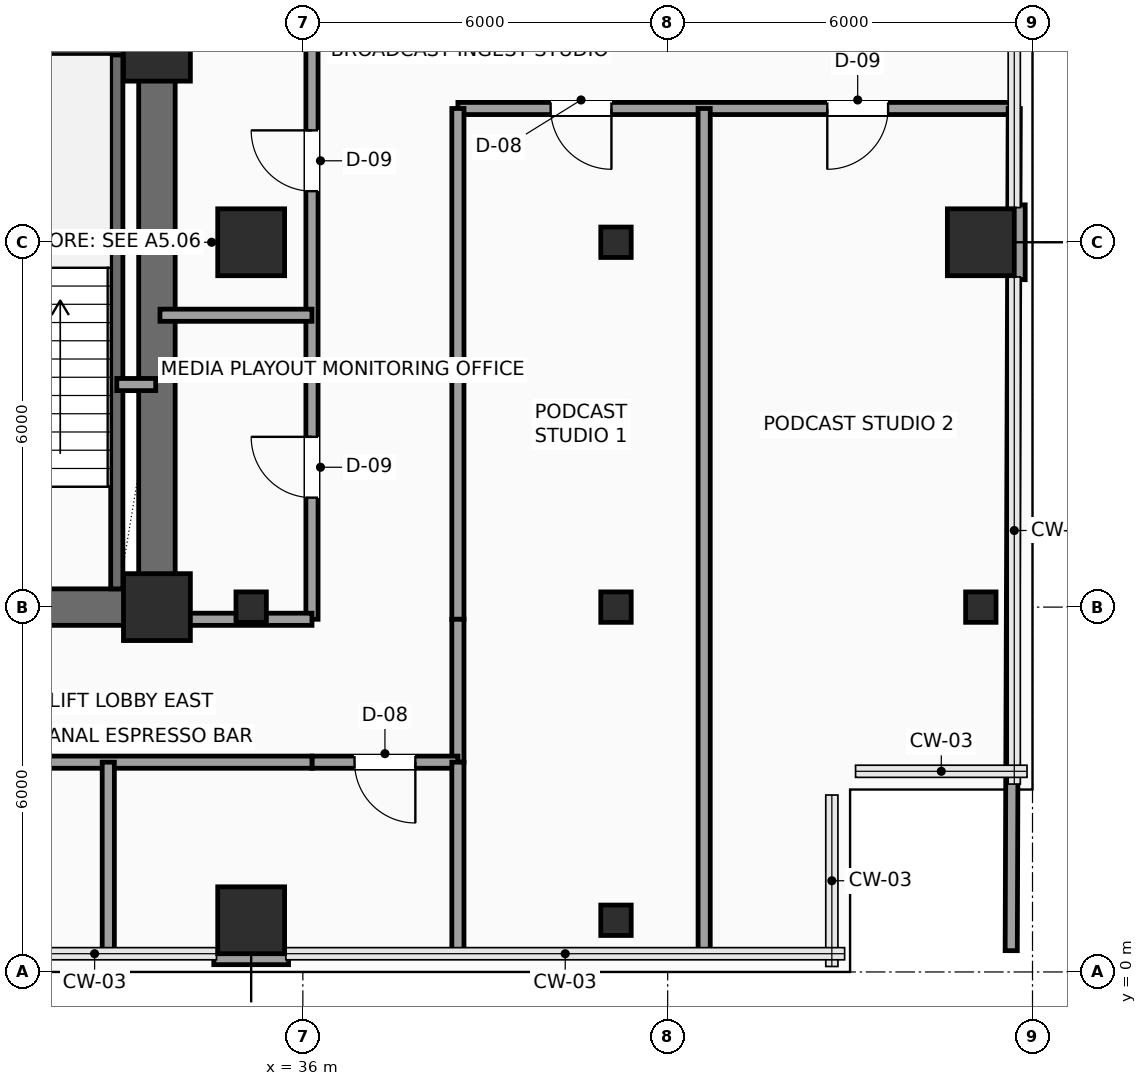
"""IFC4 building model, lengths in metres.
Left out: names, types, materials, properties, quantities, classifications, styles, units other than length and angle.
Written with IfcOpenShell. Run it as: python <this file> out.ifc"""

import sys

from ifc_helpers import new_model, si_unit, direction, frame, frame_2d, origin, origin_2d, place, context, subcontext, project, spatial, rectangle, hollow_rectangle, extrude, element, fill, save


model = new_model("IFC4")
c1 = context("Model", 3, precision=1e-05, world=origin(), true_north=direction((0.0, 1.0)))
c2 = subcontext(c1, "Body", "Model", "MODEL_VIEW")
j1 = project(units=[si_unit("LENGTHUNIT", "METRE"), si_unit("PLANEANGLEUNIT", "RADIAN")], contexts=[c1])
p1 = place(None, origin())
s1 = spatial("IfcSite", under=j1, at=p1, CompositionType="ELEMENT")
p2 = place(p1, origin())
s2 = spatial("IfcBuilding", under=s1, at=p2, CompositionType="ELEMENT")
p3 = place(p2, frame((0.0, 0.0, 115.65)))
s3 = spatial("IfcBuildingStorey", under=s2, at=p3, CompositionType="ELEMENT", Elevation=115.65)
for number, where, z_axis, x_axis in (
    (1, (33.6, 6.0, 0.0), (0.0, 0.0, 1.0), (1.0, 0.0, 0.0)),
    (2, (33.6, 15.2, 0.0), (0.0, 0.0, 1.0), (1.0, 0.0, 0.0)),
    (3, (35.15, 0.85, 0.0), (0.0, 0.0, 1.0), (1.0, 0.0, 0.0)),
):
    element("IfcColumn", number, at=place(p3, frame(where, z_axis=z_axis, x_axis=x_axis)), inside=s3, PredefinedType="COLUMN", context=c2, shape_type="SweptSolid", body=[
        extrude(rectangle(XDim=1.1, YDim=1.1, at=origin_2d()), origin(), (0.0, 0.0, 1.0), 3.75),
    ])
p4 = place(p3, frame((35.15, 6.0, 0.0), z_axis=(0.0, 0.0, 1.0), x_axis=(1.0, 0.0, 0.0)))
e4 = element("IfcColumn", 4, at=p4, inside=s3, PredefinedType="COLUMN", context=c2, shape_type="SweptSolid", body=[
    extrude(hollow_rectangle(XDim=0.5, YDim=0.5, WallThickness=0.025, InnerFilletRadius=0.025, OuterFilletRadius=0.04, at=origin_2d()), origin(), (0.0, 0.0, 1.0), 3.75),
])
p5 = place(p3, frame((35.15, 12.0, 0.0), z_axis=(0.0, 0.0, 1.0), x_axis=(1.0, 0.0, 0.0)))
e5 = element("IfcColumn", 5, at=p5, inside=s3, PredefinedType="COLUMN", context=c2, shape_type="SweptSolid", body=[
    extrude(rectangle(XDim=1.1, YDim=1.1, at=origin_2d()), origin(), (0.0, 0.0, 1.0), 3.75),
])
for number, where, z_axis, x_axis in (
    (6, (41.15, 0.85, 0.0), (0.0, 0.0, 1.0), (1.0, 0.0, 0.0)),
    (7, (41.15, 6.0, 0.0), (0.0, 0.0, 1.0), (1.0, 0.0, 0.0)),
    (8, (41.15, 12.0, 0.0), (0.0, 0.0, 1.0), (1.0, 0.0, 0.0)),
    (9, (47.15, 6.0, 0.0), (0.0, 0.0, 1.0), (1.0, 0.0, 0.0)),
):
    element("IfcColumn", number, at=place(p3, frame(where, z_axis=z_axis, x_axis=x_axis)), inside=s3, PredefinedType="COLUMN", context=c2, shape_type="SweptSolid", body=[
        extrude(hollow_rectangle(XDim=0.5, YDim=0.5, WallThickness=0.025, InnerFilletRadius=0.025, OuterFilletRadius=0.04, at=origin_2d()), origin(), (0.0, 0.0, 1.0), 3.75),
    ])
p6 = place(p3, frame((47.15, 12.0, 0.0), z_axis=(0.0, 0.0, 1.0), x_axis=(1.0, 0.0, 0.0)))
e10 = element("IfcColumn", 10, at=p6, inside=s3, PredefinedType="COLUMN", context=c2, shape_type="SweptSolid", body=[
    extrude(rectangle(XDim=1.1, YDim=1.1, at=origin_2d()), origin(), (0.0, 0.0, 1.0), 3.75),
])
for number, where, z_axis, x_axis in (
    (11, (47.76, 12.615, 0.0), (0.0, 0.0, 1.0), (0.0, -1.0, 0.0)),
    (12, (35.765, 0.24, 0.0), (0.0, 0.0, 1.0), (-1.0, 0.0, 0.0)),
):
    element("IfcWall", number, at=place(p3, frame(where, z_axis=z_axis, x_axis=x_axis)), inside=s3, PredefinedType="SOLIDWALL", context=c2, shape_type="SweptSolid", body=[
        extrude(rectangle(XDim=1.23, YDim=0.24, at=frame_2d((0.615, 0.0))), origin(), (0.0, 0.0, 1.0), 3.525),
    ])
p7 = place(p3, frame((24.0, 6.0, 0.0), z_axis=(0.0, 0.0, 1.0), x_axis=(1.0, 0.0, 0.0)))
e13 = element("IfcWall", 13, at=p7, inside=s3, PredefinedType="SHEAR", context=c2, shape_type="SweptSolid", body=[
    extrude(rectangle(XDim=9.6, YDim=0.6, at=frame_2d((4.8, 0.0))), origin(), (0.0, 0.0, 1.0), 3.525),
])
p8 = place(p3, frame((33.6, 6.0, 0.0), z_axis=(0.0, 0.0, 1.0), x_axis=(0.0, 1.0, 0.0)))
e14 = element("IfcWall", 14, at=p8, inside=s3, PredefinedType="SHEAR", context=c2, shape_type="SweptSolid", body=[
    extrude(rectangle(XDim=12.0, YDim=0.6, at=frame_2d((6.0, 0.0))), origin(), (0.0, 0.0, 1.0), 3.525),
])
p9 = place(p8, frame((10.15, 0.0, 0.0)))
e15 = element("IfcOpeningElement", 15, at=p9, cuts=e14, PredefinedType="OPENING", context=c2, shape_type="SweptSolid", body=[
    extrude(rectangle(XDim=0.9, YDim=2.15, at=frame_2d((0.45, 1.075))), frame((0.0, 0.31, 0.0), z_axis=(0.0, -1.0, 0.0), x_axis=(1.0, 0.0, 0.0)), (0.0, 0.0, 1.0), 0.62),
])
p10 = place(p3, frame((32.94, 6.3, 0.0), z_axis=(0.0, 0.0, 1.0), x_axis=(0.0, 1.0, 0.0)))
e16 = element("IfcWall", 16, at=p10, inside=s3, PredefinedType="SHEAR", context=c2, shape_type="SweptSolid", body=[
    extrude(rectangle(XDim=8.88, YDim=0.2, at=frame_2d((4.44, 0.0))), origin(), (0.0, 0.0, 1.0), 3.525),
])
p11 = place(p3, frame((29.26, 15.18, 0.0), z_axis=(0.0, 0.0, 1.0), x_axis=(1.0, 0.0, 0.0)))
e17 = element("IfcWall", 17, at=p11, inside=s3, PredefinedType="SHEAR", context=c2, shape_type="SweptSolid", body=[
    extrude(rectangle(XDim=4.04, YDim=0.2, at=frame_2d((2.02, 0.0))), origin(), (0.0, 0.0, 1.0), 3.525),
])
p12 = place(p3, frame((32.94, 9.66, 0.0), z_axis=(0.0, 0.0, 1.0), x_axis=(1.0, 0.0, 0.0)))
e18 = element("IfcWall", 18, at=p12, inside=s3, PredefinedType="SOLIDWALL", context=c2, shape_type="SweptSolid", body=[
    extrude(rectangle(XDim=0.64, YDim=0.2, at=frame_2d((0.32, 0.0))), origin(), (0.0, 0.0, 1.0), 3.525),
])
p13 = place(p3, frame((36.15, 5.8, 0.0), z_axis=(0.0, 0.0, 1.0), x_axis=(0.0, 1.0, 0.0)))
e19 = element("IfcWall", 19, at=p13, inside=s3, PredefinedType="SOLIDWALL", context=c2, shape_type="SweptSolid", body=[
    extrude(rectangle(XDim=10.08, YDim=0.2, at=frame_2d((5.04, 0.0))), origin(), (0.0, 0.0, 1.0), 3.525),
])
p14 = place(p13, frame((2.0, 0.0, 0.0)))
e20 = element("IfcOpeningElement", 20, at=p14, cuts=e19, PredefinedType="OPENING", context=c2, shape_type="SweptSolid", body=[
    extrude(rectangle(XDim=1.0, YDim=2.2, at=frame_2d((0.5, 1.1))), frame((0.0, 0.11, 0.0), z_axis=(0.0, -1.0, 0.0), x_axis=(1.0, 0.0, 0.0)), (0.0, 0.0, 1.0), 0.22),
])
p15 = place(p13, frame((7.04, 0.0, 0.0)))
e21 = element("IfcOpeningElement", 21, at=p15, cuts=e19, PredefinedType="OPENING", context=c2, shape_type="SweptSolid", body=[
    extrude(rectangle(XDim=1.0, YDim=2.2, at=frame_2d((0.5, 1.1))), frame((0.0, 0.11, 0.0), z_axis=(0.0, -1.0, 0.0), x_axis=(1.0, 0.0, 0.0)), (0.0, 0.0, 1.0), 0.22),
])
p16 = place(p3, frame((47.7, 14.2, 0.0), z_axis=(0.0, 0.0, 1.0), x_axis=(-1.0, 0.0, 0.0)))
e22 = element("IfcWall", 22, at=p16, inside=s3, PredefinedType="SOLIDWALL", context=c2, shape_type="SweptSolid", body=[
    extrude(rectangle(XDim=9.15, YDim=0.2, at=frame_2d((4.575, 0.0))), origin(), (0.0, 0.0, 1.0), 3.525),
])
p17 = place(p16, frame((6.625, 0.0, 0.0)))
e23 = element("IfcOpeningElement", 23, at=p17, cuts=e22, PredefinedType="OPENING", context=c2, shape_type="SweptSolid", body=[
    extrude(rectangle(XDim=1.0, YDim=2.2, at=frame_2d((0.5, 1.1))), frame((0.0, 0.11, 0.0), z_axis=(0.0, -1.0, 0.0), x_axis=(1.0, 0.0, 0.0)), (0.0, 0.0, 1.0), 0.22),
])
p18 = place(p16, frame((2.075, 0.0, 0.0)))
e24 = element("IfcOpeningElement", 24, at=p18, cuts=e22, PredefinedType="OPENING", context=c2, shape_type="SweptSolid", body=[
    extrude(rectangle(XDim=1.0, YDim=2.2, at=frame_2d((0.5, 1.1))), frame((0.0, 0.11, 0.0), z_axis=(0.0, -1.0, 0.0), x_axis=(1.0, 0.0, 0.0)), (0.0, 0.0, 1.0), 0.22),
])
p19 = place(p3, frame((38.55, 14.2, 0.0), z_axis=(0.0, 0.0, 1.0), x_axis=(0.0, -1.0, 0.0)))
e25 = element("IfcWall", 25, at=p19, inside=s3, PredefinedType="SOLIDWALL", context=c2, shape_type="SweptSolid", body=[
    extrude(rectangle(XDim=8.4, YDim=0.2, at=frame_2d((4.2, 0.0))), origin(), (0.0, 0.0, 1.0), 3.525),
])
p20 = place(p3, frame((38.55, 5.8, 0.0), z_axis=(0.0, 0.0, 1.0), x_axis=(0.0, -1.0, 0.0)))
e26 = element("IfcWall", 26, at=p20, inside=s3, PredefinedType="SOLIDWALL", context=c2, shape_type="SweptSolid", body=[
    extrude(rectangle(XDim=2.35, YDim=0.2, at=frame_2d((1.175, 0.0))), origin(), (0.0, 0.0, 1.0), 3.525),
])
p21 = place(p3, frame((38.55, 3.45, 0.0), z_axis=(0.0, 0.0, 1.0), x_axis=(-1.0, 0.0, 0.0)))
e27 = element("IfcWall", 27, at=p21, inside=s3, PredefinedType="SOLIDWALL", context=c2, shape_type="SweptSolid", body=[
    extrude(rectangle(XDim=2.4, YDim=0.2, at=frame_2d((1.2, 0.0))), origin(), (0.0, 0.0, 1.0), 3.067),
])
p22 = place(p21, frame((0.7, 0.0, 0.0)))
e28 = element("IfcOpeningElement", 28, at=p22, cuts=e27, PredefinedType="OPENING", context=c2, shape_type="SweptSolid", body=[
    extrude(rectangle(XDim=1.0, YDim=2.2, at=frame_2d((0.5, 1.1))), frame((0.0, 0.11, 0.0), z_axis=(0.0, -1.0, 0.0), x_axis=(1.0, 0.0, 0.0)), (0.0, 0.0, 1.0), 0.22),
])
p23 = place(p3, frame((36.15, 3.45, 0.0), z_axis=(0.0, 0.0, 1.0), x_axis=(-1.0, 0.0, 0.0)))
e29 = element("IfcWall", 29, at=p23, inside=s3, PredefinedType="SOLIDWALL", context=c2, shape_type="SweptSolid", body=[
    extrude(rectangle(XDim=12.2, YDim=0.2, at=frame_2d((6.1, 0.0))), origin(), (0.0, 0.0, 1.0), 3.067),
])
p24 = place(p23, frame((10.125, 0.0, 0.0)))
e30 = element("IfcOpeningElement", 30, at=p24, cuts=e29, PredefinedType="OPENING", context=c2, shape_type="SweptSolid", body=[
    extrude(rectangle(XDim=1.0, YDim=2.2, at=frame_2d((0.5, 1.1))), frame((0.0, 0.11, 0.0), z_axis=(0.0, -1.0, 0.0), x_axis=(1.0, 0.0, 0.0)), (0.0, 0.0, 1.0), 0.22),
])
p25 = place(p23, frame((5.7, 0.0, 0.0)))
e31 = element("IfcOpeningElement", 31, at=p25, cuts=e29, PredefinedType="OPENING", context=c2, shape_type="SweptSolid", body=[
    extrude(rectangle(XDim=1.0, YDim=2.2, at=frame_2d((0.5, 1.1))), frame((0.0, 0.11, 0.0), z_axis=(0.0, -1.0, 0.0), x_axis=(1.0, 0.0, 0.0)), (0.0, 0.0, 1.0), 0.22),
])
for number, where, z_axis, x_axis in (
    (32, (32.8, 0.3, 0.0), (0.0, 0.0, 1.0), (0.0, 1.0, 0.0)),
    (33, (38.55, 0.3, 0.0), (0.0, 0.0, 1.0), (0.0, 1.0, 0.0)),
):
    element("IfcWall", number, at=place(p3, frame(where, z_axis=z_axis, x_axis=x_axis)), inside=s3, PredefinedType="PARTITIONING", context=c2, shape_type="SweptSolid", body=[
        extrude(rectangle(XDim=3.15, YDim=0.2, at=frame_2d((1.575, 0.0))), origin(), (0.0, 0.0, 1.0), 3.525),
    ])
p26 = place(p3, frame((33.65, 5.8, 0.0), z_axis=(0.0, 0.0, 1.0), x_axis=(1.0, 0.0, 0.0)))
e34 = element("IfcWall", 34, at=p26, inside=s3, PredefinedType="PARTITIONING", context=c2, shape_type="SweptSolid", body=[
    extrude(rectangle(XDim=2.5, YDim=0.2, at=frame_2d((1.25, 0.0))), origin(), (0.0, 0.0, 1.0), 3.017),
])
p27 = place(p3, frame((33.65, 10.8, 0.0), z_axis=(0.0, 0.0, 1.0), x_axis=(1.0, 0.0, 0.0)))
e35 = element("IfcWall", 35, at=p27, inside=s3, PredefinedType="PARTITIONING", context=c2, shape_type="SweptSolid", body=[
    extrude(rectangle(XDim=2.5, YDim=0.2, at=frame_2d((1.25, 0.0))), origin(), (0.0, 0.0, 1.0), 3.525),
])
p28 = place(p3, frame((42.6, 0.3, 0.0), z_axis=(0.0, 0.0, 1.0), x_axis=(0.0, 1.0, 0.0)))
e36 = element("IfcWall", 36, at=p28, inside=s3, PredefinedType="PARTITIONING", context=c2, shape_type="SweptSolid", body=[
    extrude(rectangle(XDim=13.9, YDim=0.2, at=frame_2d((6.95, 0.0))), origin(), (0.0, 0.0, 1.0), 3.525),
])
p29 = place(p3, frame((47.65, 0.35, 0.0), z_axis=(0.0, 0.0, 1.0), x_axis=(0.003606251025, 0.999993497456, 0.0)))
e37 = element("IfcWall", 37, at=p29, inside=s3, PredefinedType="PARTITIONING", context=c2, shape_type="SweptSolid", body=[
    extrude(rectangle(XDim=11.035, YDim=0.2, at=frame_2d((5.518, 0.0))), origin(), (0.0, 0.0, 1.0), 3.525),
])
p30 = place(p3, frame((47.694, 12.615, 0.0), z_axis=(0.0, 0.0, 1.0), x_axis=(0.003542799701, 0.999993724265, 0.0)))
e38 = element("IfcWall", 38, at=p30, inside=s3, PredefinedType="PARTITIONING", context=c2, shape_type="SweptSolid", body=[
    extrude(rectangle(XDim=1.585, YDim=0.2, at=frame_2d((0.792, 0.0))), origin(), (0.0, 0.0, 1.0), 3.525),
])
p31 = place(p14, origin())
e39 = element("IfcDoor", 39, at=p31, inside=s3, OperationType="SINGLE_SWING_RIGHT", PredefinedType="DOOR", context=c2, shape_type="SweptSolid", body=[
    extrude(rectangle(XDim=1.0, YDim=2.2, at=frame_2d((0.5, 1.1))), frame((0.0, 0.025, 0.0), z_axis=(0.0, -1.0, 0.0), x_axis=(1.0, 0.0, 0.0)), (0.0, 0.0, 1.0), 0.05),
])
fill(e20, e39)
p32 = place(p15, origin())
e40 = element("IfcDoor", 40, at=p32, inside=s3, OperationType="SINGLE_SWING_RIGHT", PredefinedType="DOOR", context=c2, shape_type="SweptSolid", body=[
    extrude(rectangle(XDim=1.0, YDim=2.2, at=frame_2d((0.5, 1.1))), frame((0.0, 0.025, 0.0), z_axis=(0.0, -1.0, 0.0), x_axis=(1.0, 0.0, 0.0)), (0.0, 0.0, 1.0), 0.05),
])
fill(e21, e40)
p33 = place(p17, origin())
e41 = element("IfcDoor", 41, at=p33, inside=s3, OperationType="SINGLE_SWING_LEFT", PredefinedType="DOOR", context=c2, shape_type="SweptSolid", body=[
    extrude(rectangle(XDim=1.0, YDim=2.2, at=frame_2d((0.5, 1.1))), frame((0.0, 0.025, 0.0), z_axis=(0.0, -1.0, 0.0), x_axis=(1.0, 0.0, 0.0)), (0.0, 0.0, 1.0), 0.05),
])
fill(e23, e41)
p34 = place(p18, origin())
e42 = element("IfcDoor", 42, at=p34, inside=s3, OperationType="SINGLE_SWING_RIGHT", PredefinedType="DOOR", context=c2, shape_type="SweptSolid", body=[
    extrude(rectangle(XDim=1.0, YDim=2.2, at=frame_2d((0.5, 1.1))), frame((0.0, 0.025, 0.0), z_axis=(0.0, -1.0, 0.0), x_axis=(1.0, 0.0, 0.0)), (0.0, 0.0, 1.0), 0.05),
])
fill(e24, e42)
p35 = place(p22, origin())
e43 = element("IfcDoor", 43, at=p35, inside=s3, OperationType="SINGLE_SWING_LEFT", PredefinedType="DOOR", context=c2, shape_type="SweptSolid", body=[
    extrude(rectangle(XDim=1.0, YDim=2.2, at=frame_2d((0.5, 1.1))), frame((0.0, 0.025, 0.0), z_axis=(0.0, -1.0, 0.0), x_axis=(1.0, 0.0, 0.0)), (0.0, 0.0, 1.0), 0.05),
])
fill(e28, e43)
save(model, sys.argv[1])
